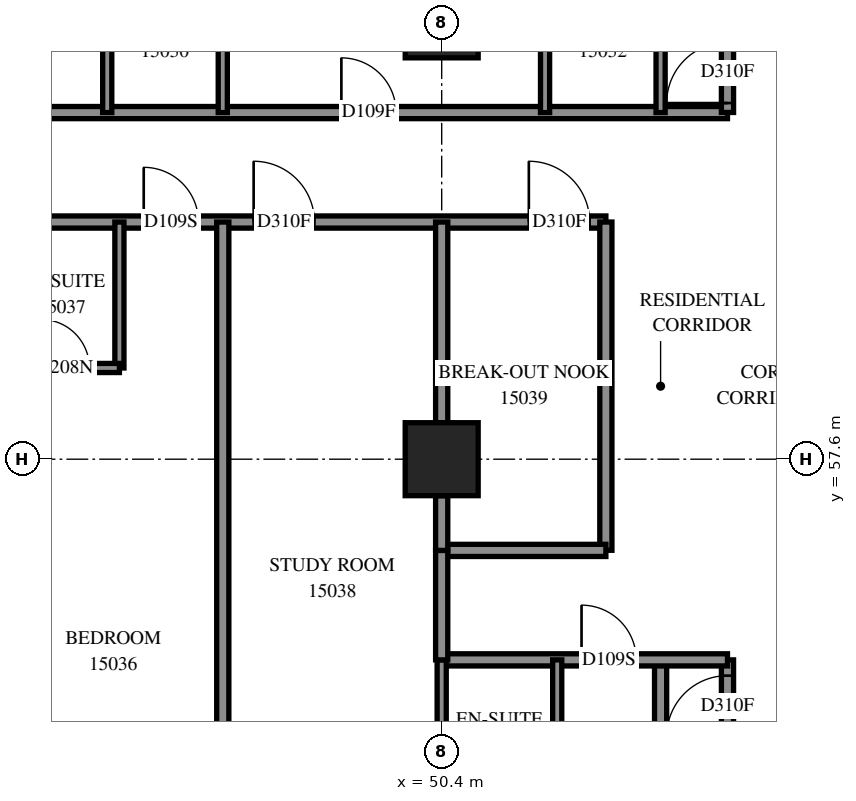
"""IFC4 building model, lengths in metres.
Left out: names, types, materials, properties, quantities, classifications, styles, units other than length and angle.
Written with IfcOpenShell. Run it as: python <this file> out.ifc"""

import sys

from ifc_helpers import new_model, si_unit, direction, frame, frame_2d, origin, origin_2d, place, context, subcontext, project, spatial, rectangle, extrude, element, fill, save


model = new_model("IFC4")
c1 = context("Model", 3, precision=1e-05, world=origin(), true_north=direction((0.0, 1.0)))
c2 = subcontext(c1, "Body", "Model", "MODEL_VIEW")
j1 = project(units=[si_unit("LENGTHUNIT", "METRE"), si_unit("PLANEANGLEUNIT", "RADIAN")], contexts=[c1])
p1 = place(None, origin())
s1 = spatial("IfcSite", under=j1, at=p1, CompositionType="ELEMENT")
p2 = place(p1, origin())
s2 = spatial("IfcBuilding", under=s1, at=p2, CompositionType="ELEMENT")
p3 = place(p2, frame((0.0, 0.0, 57.6)))
s3 = spatial("IfcBuildingStorey", under=s2, at=p3, CompositionType="ELEMENT", Elevation=57.6)
for number, where, z_axis, x_axis in (
    (1, (50.4, 57.6, 0.0), (0.0, 0.0, 1.0), (1.0, 0.0, 0.0)),
    (2, (50.4, 64.8, 0.0), (0.0, 0.0, 1.0), (1.0, 0.0, 0.0)),
):
    element("IfcColumn", number, at=place(p3, frame(where, z_axis=z_axis, x_axis=x_axis)), inside=s3, PredefinedType="COLUMN", context=c2, shape_type="SweptSolid", body=[
        extrude(rectangle(XDim=1.2, YDim=1.2, at=origin_2d()), origin(), (0.0, 0.0, 1.0), 3.1),
    ])
p4 = place(p3, frame((28.8, 61.5, 0.0), z_axis=(0.0, 0.0, 1.0), x_axis=(1.0, 0.0, 0.0)))
e3 = element("IfcWall", 3, at=p4, inside=s3, PredefinedType="PARTITIONING", context=c2, shape_type="SweptSolid", body=[
    extrude(rectangle(XDim=24.3, YDim=0.2, at=frame_2d((12.15, 0.0))), origin(), (0.0, 0.0, 1.0), 3.1),
])
p5 = place(p4, frame((3.899, 0.0, 0.0)))
e4 = element("IfcOpeningElement", 4, at=p5, cuts=e3, PredefinedType="OPENING", context=c2, shape_type="SweptSolid", body=[
    extrude(rectangle(XDim=0.9, YDim=2.1, at=frame_2d((0.45, 1.05))), frame((0.0, 0.11, 0.0), z_axis=(0.0, -1.0, 0.0), x_axis=(1.0, 0.0, 0.0)), (0.0, 0.0, 1.0), 0.22),
])
p6 = place(p4, frame((9.5, 0.0, 0.0)))
e5 = element("IfcOpeningElement", 5, at=p6, cuts=e3, PredefinedType="OPENING", context=c2, shape_type="SweptSolid", body=[
    extrude(rectangle(XDim=0.9, YDim=2.1, at=frame_2d((0.45, 1.05))), frame((0.0, 0.11, 0.0), z_axis=(0.0, -1.0, 0.0), x_axis=(1.0, 0.0, 0.0)), (0.0, 0.0, 1.0), 0.22),
])
p7 = place(p4, frame((11.307, 0.0, 0.0)))
e6 = element("IfcOpeningElement", 6, at=p7, cuts=e3, PredefinedType="OPENING", context=c2, shape_type="SweptSolid", body=[
    extrude(rectangle(XDim=1.0, YDim=2.1, at=frame_2d((0.5, 1.05))), frame((0.0, 0.11, 0.0), z_axis=(0.0, -1.0, 0.0), x_axis=(1.0, 0.0, 0.0)), (0.0, 0.0, 1.0), 0.22),
])
p8 = place(p4, frame((16.7, 0.0, 0.0)))
e7 = element("IfcOpeningElement", 7, at=p8, cuts=e3, PredefinedType="OPENING", context=c2, shape_type="SweptSolid", body=[
    extrude(rectangle(XDim=0.9, YDim=2.1, at=frame_2d((0.45, 1.05))), frame((0.0, 0.11, 0.0), z_axis=(0.0, -1.0, 0.0), x_axis=(1.0, 0.0, 0.0)), (0.0, 0.0, 1.0), 0.22),
])
p9 = place(p4, frame((18.508, 0.0, 0.0)))
e8 = element("IfcOpeningElement", 8, at=p9, cuts=e3, PredefinedType="OPENING", context=c2, shape_type="SweptSolid", body=[
    extrude(rectangle(XDim=1.0, YDim=2.1, at=frame_2d((0.5, 1.05))), frame((0.0, 0.11, 0.0), z_axis=(0.0, -1.0, 0.0), x_axis=(1.0, 0.0, 0.0)), (0.0, 0.0, 1.0), 0.22),
])
p10 = place(p4, frame((23.033, 0.0, 0.0)))
e9 = element("IfcOpeningElement", 9, at=p10, cuts=e3, PredefinedType="OPENING", context=c2, shape_type="SweptSolid", body=[
    extrude(rectangle(XDim=1.0, YDim=2.1, at=frame_2d((0.5, 1.05))), frame((0.0, 0.11, 0.0), z_axis=(0.0, -1.0, 0.0), x_axis=(1.0, 0.0, 0.0)), (0.0, 0.0, 1.0), 0.22),
])
p11 = place(p3, frame((33.302, 63.3, 0.0), z_axis=(0.0, 0.0, 1.0), x_axis=(1.0, 0.0, 0.0)))
e10 = element("IfcWall", 10, at=p11, inside=s3, PredefinedType="PARTITIONING", context=c2, shape_type="SweptSolid", body=[
    extrude(rectangle(XDim=21.798, YDim=0.2, at=frame_2d((10.899, 0.0))), origin(), (0.0, 0.0, 1.0), 3.1),
])
p12 = place(p11, frame((1.091, 0.0, 0.0)))
e11 = element("IfcOpeningElement", 11, at=p12, cuts=e10, PredefinedType="OPENING", context=c2, shape_type="SweptSolid", body=[
    extrude(rectangle(XDim=0.9, YDim=2.1, at=frame_2d((0.45, 1.05))), frame((0.0, 0.11, 0.0), z_axis=(0.0, -1.0, 0.0), x_axis=(1.0, 0.0, 0.0)), (0.0, 0.0, 1.0), 0.22),
])
p13 = place(p11, frame((8.248, 0.0, 0.0)))
e12 = element("IfcOpeningElement", 12, at=p13, cuts=e10, PredefinedType="OPENING", context=c2, shape_type="SweptSolid", body=[
    extrude(rectangle(XDim=0.9, YDim=2.1, at=frame_2d((0.45, 1.05))), frame((0.0, 0.11, 0.0), z_axis=(0.0, -1.0, 0.0), x_axis=(1.0, 0.0, 0.0)), (0.0, 0.0, 1.0), 0.22),
])
p14 = place(p11, frame((15.448, 0.0, 0.0)))
e13 = element("IfcOpeningElement", 13, at=p14, cuts=e10, PredefinedType="OPENING", context=c2, shape_type="SweptSolid", body=[
    extrude(rectangle(XDim=0.9, YDim=2.1, at=frame_2d((0.45, 1.05))), frame((0.0, 0.11, 0.0), z_axis=(0.0, -1.0, 0.0), x_axis=(1.0, 0.0, 0.0)), (0.0, 0.0, 1.0), 0.22),
])
p15 = place(p3, frame((54.0, 42.324, 0.0), z_axis=(0.0, 0.0, 1.0), x_axis=(0.0, 1.0, 0.0)))
e14 = element("IfcWall", 14, at=p15, inside=s3, PredefinedType="PARTITIONING", context=c2, shape_type="SweptSolid", body=[
    extrude(rectangle(XDim=11.976, YDim=0.2, at=frame_2d((5.988, 0.0))), origin(), (0.0, 0.0, 1.0), 3.1),
])
p16 = place(p3, frame((46.8, 49.75, 0.0), z_axis=(0.0, 0.0, 1.0), x_axis=(0.0, 1.0, 0.0)))
e15 = element("IfcWall", 15, at=p16, inside=s3, PredefinedType="PARTITIONING", context=c2, shape_type="SweptSolid", body=[
    extrude(rectangle(XDim=11.75, YDim=0.2, at=frame_2d((5.875, 0.0))), origin(), (0.0, 0.0, 1.0), 3.1),
])
p17 = place(p3, frame((55.1, 47.9, 0.0), z_axis=(0.0, 0.0, 1.0), x_axis=(0.0, 1.0, 0.0)))
e16 = element("IfcWall", 16, at=p17, inside=s3, PredefinedType="PARTITIONING", context=c2, shape_type="SweptSolid", body=[
    extrude(rectangle(XDim=6.4, YDim=0.2, at=frame_2d((3.2, 0.0))), origin(), (0.0, 0.0, 1.0), 3.1),
])
p18 = place(p17, frame((5.141, 0.0, 0.0)))
e17 = element("IfcOpeningElement", 17, at=p18, cuts=e16, PredefinedType="OPENING", context=c2, shape_type="SweptSolid", body=[
    extrude(rectangle(XDim=1.0, YDim=2.1, at=frame_2d((0.5, 1.05))), frame((0.0, 0.11, 0.0), z_axis=(0.0, -1.0, 0.0), x_axis=(1.0, 0.0, 0.0)), (0.0, 0.0, 1.0), 0.22),
])
p19 = place(p3, frame((53.1, 56.102, 0.0), z_axis=(0.0, 0.0, 1.0), x_axis=(0.0, 1.0, 0.0)))
e18 = element("IfcWall", 18, at=p19, inside=s3, PredefinedType="PARTITIONING", context=c2, shape_type="SweptSolid", body=[
    extrude(rectangle(XDim=5.398, YDim=0.2, at=frame_2d((2.699, 0.0))), origin(), (0.0, 0.0, 1.0), 3.1),
])
p20 = place(p3, frame((50.4, 54.3, 0.0), z_axis=(0.0, 0.0, 1.0), x_axis=(1.0, 0.0, 0.0)))
e19 = element("IfcWall", 19, at=p20, inside=s3, PredefinedType="PARTITIONING", context=c2, shape_type="SweptSolid", body=[
    extrude(rectangle(XDim=4.7, YDim=0.2, at=frame_2d((2.35, 0.0))), origin(), (0.0, 0.0, 1.0), 3.1),
])
p21 = place(p20, frame((2.3, 0.0, 0.0)))
e20 = element("IfcOpeningElement", 20, at=p21, cuts=e19, PredefinedType="OPENING", context=c2, shape_type="SweptSolid", body=[
    extrude(rectangle(XDim=0.9, YDim=2.1, at=frame_2d((0.45, 1.05))), frame((0.0, 0.11, 0.0), z_axis=(0.0, -1.0, 0.0), x_axis=(1.0, 0.0, 0.0)), (0.0, 0.0, 1.0), 0.22),
])
p22 = place(p3, frame((55.1, 63.302, 0.0), z_axis=(0.0, 0.0, 1.0), x_axis=(0.0, 1.0, 0.0)))
e21 = element("IfcWall", 21, at=p22, inside=s3, PredefinedType="PARTITIONING", context=c2, shape_type="SweptSolid", body=[
    extrude(rectangle(XDim=3.998, YDim=0.2, at=frame_2d((1.999, 0.0))), origin(), (0.0, 0.0, 1.0), 3.1),
])
p23 = place(p22, frame((0.154, 0.0, 0.0)))
e22 = element("IfcOpeningElement", 22, at=p23, cuts=e21, PredefinedType="OPENING", context=c2, shape_type="SweptSolid", body=[
    extrude(rectangle(XDim=1.0, YDim=2.1, at=frame_2d((0.5, 1.05))), frame((0.0, 0.11, 0.0), z_axis=(0.0, -1.0, 0.0), x_axis=(1.0, 0.0, 0.0)), (0.0, 0.0, 1.0), 0.22),
])
p24 = place(p3, frame((50.4, 58.2, 0.0), z_axis=(0.0, 0.0, 1.0), x_axis=(0.0, 1.0, 0.0)))
e23 = element("IfcWall", 23, at=p24, inside=s3, PredefinedType="PARTITIONING", context=c2, shape_type="SweptSolid", body=[
    extrude(rectangle(XDim=3.3, YDim=0.2, at=frame_2d((1.65, 0.0))), origin(), (0.0, 0.0, 1.0), 3.1),
])
p25 = place(p3, frame((50.4, 56.1, 0.0), z_axis=(0.0, 0.0, 1.0), x_axis=(1.0, 0.0, 0.0)))
e24 = element("IfcWall", 24, at=p25, inside=s3, PredefinedType="PARTITIONING", context=c2, shape_type="SweptSolid", body=[
    extrude(rectangle(XDim=2.7, YDim=0.2, at=frame_2d((1.35, 0.0))), origin(), (0.0, 0.0, 1.0), 3.1),
])
for number, where, z_axis, x_axis in (
    (25, (44.9, 63.3, 0.0), (0.0, 0.0, 1.0), (0.0, 1.0, 0.0)),
    (26, (46.8, 63.3, 0.0), (0.0, 0.0, 1.0), (0.0, 1.0, 0.0)),
    (27, (52.1, 63.3, 0.0), (0.0, 0.0, 1.0), (0.0, 1.0, 0.0)),
    (28, (54.0, 63.3, 0.0), (0.0, 0.0, 1.0), (0.0, 1.0, 0.0)),
    (29, (45.1, 59.1, 0.0), (0.0, 0.0, 1.0), (0.0, 1.0, 0.0)),
    (30, (52.3, 51.9, 0.0), (0.0, 0.0, 1.0), (0.0, 1.0, 0.0)),
    (31, (50.4, 51.9, 0.0), (0.0, 0.0, 1.0), (0.0, 1.0, 0.0)),
):
    element("IfcWall", number, at=place(p3, frame(where, z_axis=z_axis, x_axis=x_axis)), inside=s3, PredefinedType="PARTITIONING", context=c2, shape_type="SweptSolid", body=[
        extrude(rectangle(XDim=2.4, YDim=0.15, at=frame_2d((1.2, 0.0))), origin(), (0.0, 0.0, 1.0), 3.1),
    ])
p26 = place(p3, frame((43.2, 59.1, 0.0), z_axis=(0.0, 0.0, 1.0), x_axis=(1.0, 0.0, 0.0)))
e32 = element("IfcWall", 32, at=p26, inside=s3, PredefinedType="PARTITIONING", context=c2, shape_type="SweptSolid", body=[
    extrude(rectangle(XDim=1.9, YDim=0.15, at=frame_2d((0.95, 0.0))), origin(), (0.0, 0.0, 1.0), 3.1),
])
p27 = place(p26, frame((0.607, 0.0, 0.0)))
e33 = element("IfcOpeningElement", 33, at=p27, cuts=e32, PredefinedType="OPENING", context=c2, shape_type="SweptSolid", body=[
    extrude(rectangle(XDim=0.8, YDim=2.1, at=frame_2d((0.4, 1.05))), frame((0.0, 0.085, 0.0), z_axis=(0.0, -1.0, 0.0), x_axis=(1.0, 0.0, 0.0)), (0.0, 0.0, 1.0), 0.17),
])
p28 = place(p3, frame((50.4, 54.3, 0.0), z_axis=(0.0, 0.0, 1.0), x_axis=(0.0, 1.0, 0.0)))
e34 = element("IfcWall", 34, at=p28, inside=s3, PredefinedType="PARTITIONING", context=c2, shape_type="SweptSolid", body=[
    extrude(rectangle(XDim=1.8, YDim=0.2, at=frame_2d((0.9, 0.0))), origin(), (0.0, 0.0, 1.0), 3.1),
])
p29 = place(p3, frame((50.4, 56.1, 0.0), z_axis=(0.0, 0.0, 1.0), x_axis=(0.0, 1.0, 0.0)))
e35 = element("IfcWall", 35, at=p29, inside=s3, PredefinedType="PARTITIONING", context=c2, shape_type="SweptSolid", body=[
    extrude(rectangle(XDim=0.9, YDim=0.2, at=frame_2d((0.45, 0.0))), origin(), (0.0, 0.0, 1.0), 3.1),
])
p30 = place(p14, origin())
e36 = element("IfcDoor", 36, at=p30, inside=s3, OperationType="SINGLE_SWING_LEFT", PredefinedType="DOOR", context=c2, shape_type="SweptSolid", body=[
    extrude(rectangle(XDim=0.9, YDim=2.1, at=frame_2d((0.45, 1.05))), frame((0.0, 0.025, 0.0), z_axis=(0.0, -1.0, 0.0), x_axis=(1.0, 0.0, 0.0)), (0.0, 0.0, 1.0), 0.05),
])
fill(e13, e36)
p31 = place(p23, origin())
e37 = element("IfcDoor", 37, at=p31, inside=s3, OperationType="SINGLE_SWING_LEFT", PredefinedType="DOOR", context=c2, shape_type="SweptSolid", body=[
    extrude(rectangle(XDim=1.0, YDim=2.1, at=frame_2d((0.5, 1.05))), frame((0.0, 0.025, 0.0), z_axis=(0.0, -1.0, 0.0), x_axis=(1.0, 0.0, 0.0)), (0.0, 0.0, 1.0), 0.05),
])
fill(e22, e37)
p32 = place(p8, origin())
e38 = element("IfcDoor", 38, at=p32, inside=s3, OperationType="SINGLE_SWING_LEFT", PredefinedType="DOOR", context=c2, shape_type="SweptSolid", body=[
    extrude(rectangle(XDim=0.9, YDim=2.1, at=frame_2d((0.45, 1.05))), frame((0.0, 0.025, 0.0), z_axis=(0.0, -1.0, 0.0), x_axis=(1.0, 0.0, 0.0)), (0.0, 0.0, 1.0), 0.05),
])
fill(e7, e38)
p33 = place(p27, origin())
e39 = element("IfcDoor", 39, at=p33, inside=s3, OperationType="SINGLE_SWING_RIGHT", PredefinedType="DOOR", context=c2, shape_type="SweptSolid", body=[
    extrude(rectangle(XDim=0.8, YDim=2.1, at=frame_2d((0.4, 1.05))), frame((0.0, 0.025, 0.0), z_axis=(0.0, -1.0, 0.0), x_axis=(1.0, 0.0, 0.0)), (0.0, 0.0, 1.0), 0.05),
])
fill(e33, e39)
p34 = place(p9, origin())
e40 = element("IfcDoor", 40, at=p34, inside=s3, OperationType="SINGLE_SWING_RIGHT", PredefinedType="DOOR", context=c2, shape_type="SweptSolid", body=[
    extrude(rectangle(XDim=1.0, YDim=2.1, at=frame_2d((0.5, 1.05))), frame((0.0, 0.025, 0.0), z_axis=(0.0, -1.0, 0.0), x_axis=(1.0, 0.0, 0.0)), (0.0, 0.0, 1.0), 0.05),
])
fill(e8, e40)
p35 = place(p10, origin())
e41 = element("IfcDoor", 41, at=p35, inside=s3, OperationType="SINGLE_SWING_LEFT", PredefinedType="DOOR", context=c2, shape_type="SweptSolid", body=[
    extrude(rectangle(XDim=1.0, YDim=2.1, at=frame_2d((0.5, 1.05))), frame((0.0, 0.025, 0.0), z_axis=(0.0, -1.0, 0.0), x_axis=(1.0, 0.0, 0.0)), (0.0, 0.0, 1.0), 0.05),
])
fill(e9, e41)
p36 = place(p21, origin())
e42 = element("IfcDoor", 42, at=p36, inside=s3, OperationType="SINGLE_SWING_LEFT", PredefinedType="DOOR", context=c2, shape_type="SweptSolid", body=[
    extrude(rectangle(XDim=0.9, YDim=2.1, at=frame_2d((0.45, 1.05))), frame((0.0, 0.025, 0.0), z_axis=(0.0, -1.0, 0.0), x_axis=(1.0, 0.0, 0.0)), (0.0, 0.0, 1.0), 0.05),
])
fill(e20, e42)
p37 = place(p18, origin())
e43 = element("IfcDoor", 43, at=p37, inside=s3, OperationType="SINGLE_SWING_RIGHT", PredefinedType="DOOR", context=c2, shape_type="SweptSolid", body=[
    extrude(rectangle(XDim=1.0, YDim=2.1, at=frame_2d((0.5, 1.05))), frame((0.0, 0.025, 0.0), z_axis=(0.0, -1.0, 0.0), x_axis=(1.0, 0.0, 0.0)), (0.0, 0.0, 1.0), 0.05),
])
fill(e17, e43)
save(model, sys.argv[1])
